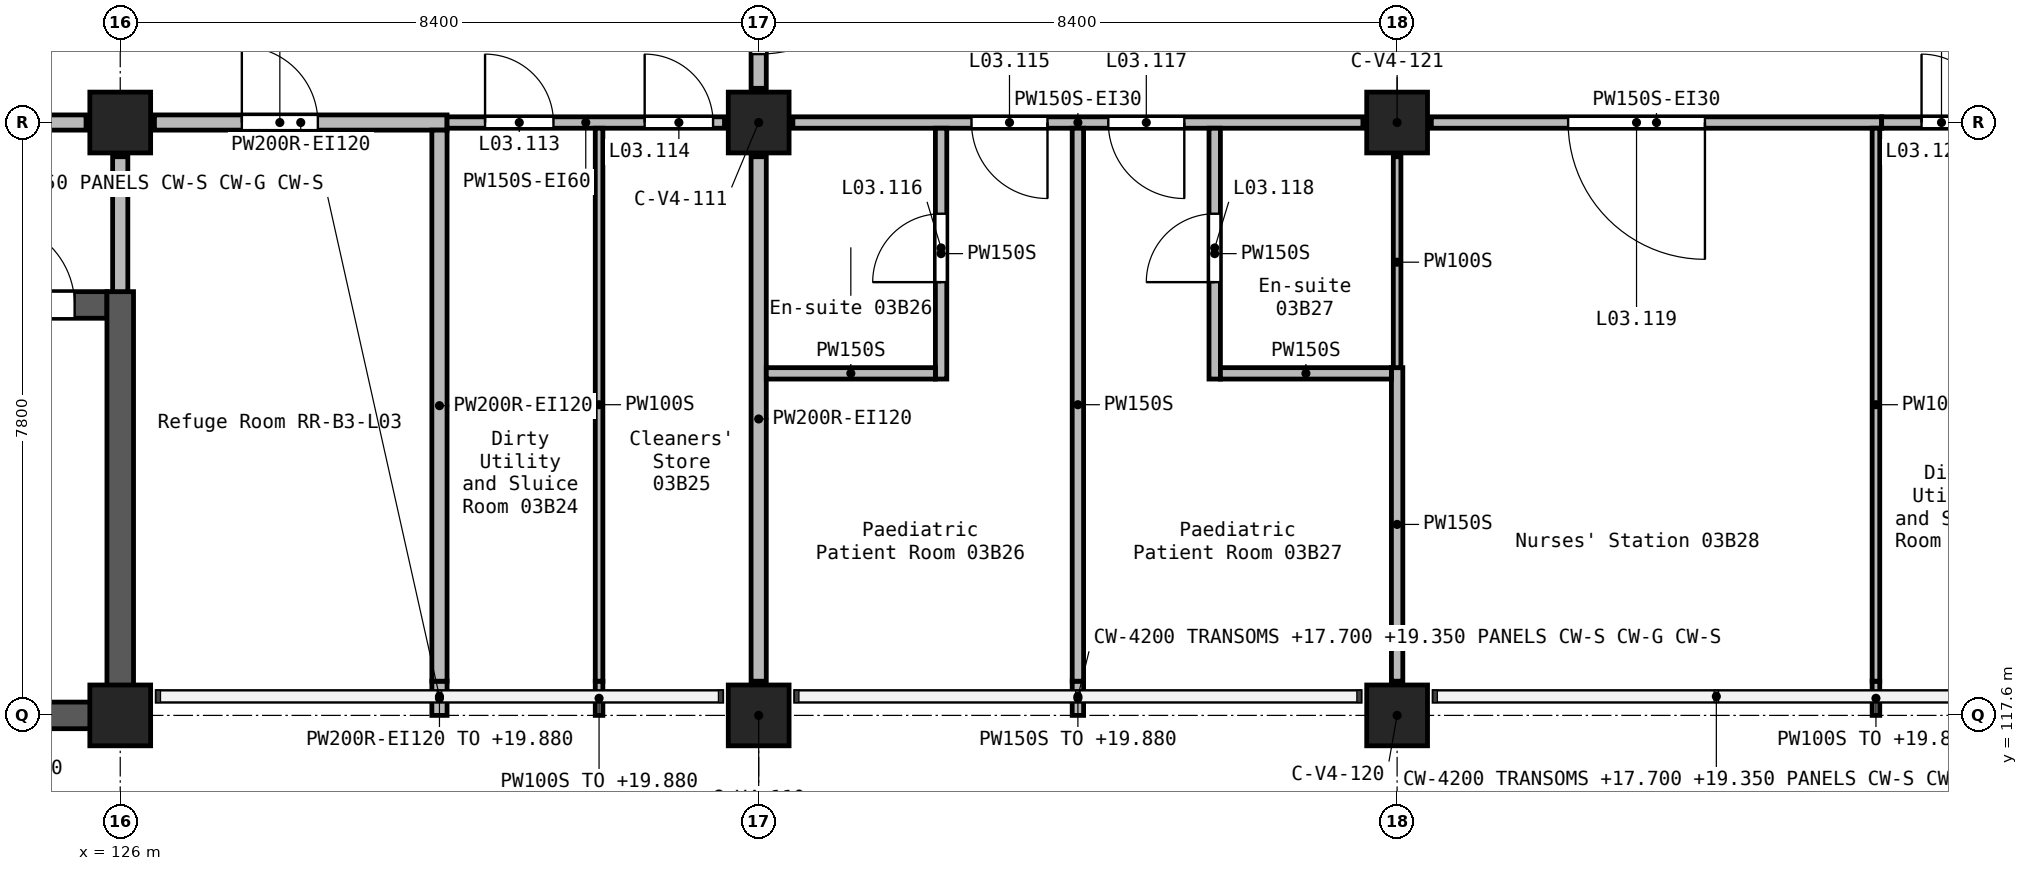
"""IFC4 building model, lengths in metres.
Left out: names, types, materials, properties, quantities, classifications, styles, units other than length and angle.
Written with IfcOpenShell. Run it as: python <this file> out.ifc"""

import sys

from ifc_helpers import new_model, si_unit, direction, frame, frame_2d, origin, origin_2d, place, context, subcontext, project, spatial, rectangle, extrude, element, fill, save


model = new_model("IFC4")
c1 = context("Model", 3, precision=1e-05, world=origin(), true_north=direction((0.0, 1.0)))
c2 = subcontext(c1, "Body", "Model", "MODEL_VIEW")
j1 = project(units=[si_unit("LENGTHUNIT", "METRE"), si_unit("PLANEANGLEUNIT", "RADIAN")], contexts=[c1])
p1 = place(None, origin())
s1 = spatial("IfcSite", under=j1, at=p1, CompositionType="ELEMENT")
p2 = place(p1, origin())
s2 = spatial("IfcBuilding", under=s1, at=p2, CompositionType="ELEMENT")
p3 = place(p2, frame((0.0, 0.0, 16.8)))
s3 = spatial("IfcBuildingStorey", under=s2, at=p3, CompositionType="ELEMENT", Elevation=16.8)
for number, where, z_axis, x_axis in (
    (1, (126.0, 117.6, 0.0), (0.0, 0.0, 1.0), (1.0, 0.0, 0.0)),
    (2, (126.0, 125.4, 0.0), (0.0, 0.0, 1.0), (1.0, 0.0, 0.0)),
    (3, (134.4, 117.6, 0.0), (0.0, 0.0, 1.0), (1.0, 0.0, 0.0)),
    (4, (134.4, 125.4, 0.0), (0.0, 0.0, 1.0), (1.0, 0.0, 0.0)),
    (5, (142.8, 117.6, 0.0), (0.0, 0.0, 1.0), (1.0, 0.0, 0.0)),
    (6, (142.8, 125.4, 0.0), (0.0, 0.0, 1.0), (1.0, 0.0, 0.0)),
):
    element("IfcColumn", number, at=place(p3, frame(where, z_axis=z_axis, x_axis=x_axis)), inside=s3, PredefinedType="COLUMN", context=c2, shape_type="SweptSolid", body=[
        extrude(rectangle(XDim=0.8, YDim=0.8, at=origin_2d()), origin(), (0.0, 0.0, 1.0), 4.2),
    ])
p4 = place(p3, frame((117.425, 123.0, 0.0), z_axis=(0.0, 0.0, 1.0), x_axis=(1.0, 0.0, 0.0)))
e7 = element("IfcWall", 7, at=p4, inside=s3, PredefinedType="SHEAR", context=c2, shape_type="SweptSolid", body=[
    extrude(rectangle(XDim=8.4, YDim=0.35, at=frame_2d((4.2, 0.0))), origin(), (0.0, 0.0, 1.0), 4.2),
])
p5 = place(p4, frame((6.875, 0.0, 0.0)))
e8 = element("IfcOpeningElement", 8, at=p5, cuts=e7, PredefinedType="OPENING", context=c2, shape_type="SweptSolid", body=[
    extrude(rectangle(XDim=1.1, YDim=2.1, at=frame_2d((0.55, 1.05))), frame((0.0, 0.185, 0.0), z_axis=(0.0, -1.0, 0.0), x_axis=(1.0, 0.0, 0.0)), (0.0, 0.0, 1.0), 0.37),
])
p6 = place(p3, frame((117.775, 117.6, 0.0), z_axis=(0.0, 0.0, 1.0), x_axis=(1.0, 0.0, 0.0)))
e9 = element("IfcWall", 9, at=p6, inside=s3, PredefinedType="SHEAR", context=c2, shape_type="SweptSolid", body=[
    extrude(rectangle(XDim=8.05, YDim=0.35, at=frame_2d((4.025, 0.0))), origin(), (0.0, 0.0, 1.0), 4.2),
])
p7 = place(p3, frame((126.0, 117.425, 0.0), z_axis=(0.0, 0.0, 1.0), x_axis=(0.0, 1.0, 0.0)))
e10 = element("IfcWall", 10, at=p7, inside=s3, PredefinedType="SHEAR", context=c2, shape_type="SweptSolid", body=[
    extrude(rectangle(XDim=5.75, YDim=0.35, at=frame_2d((2.875, 0.0))), origin(), (0.0, 0.0, 1.0), 4.2),
])
p8 = place(p3, frame((134.4, 128.55, 0.0), z_axis=(0.0, 0.0, 1.0), x_axis=(0.0, -1.0, 0.0)))
e11 = element("IfcWall", 11, at=p8, inside=s3, PredefinedType="SOLIDWALL", context=c2, shape_type="SweptSolid", body=[
    extrude(rectangle(XDim=2.7, YDim=0.2, at=frame_2d((1.35, 0.0))), origin(), (0.0, 0.0, 1.0), 3.9),
])
p9 = place(p8, frame((0.45, 0.0, 0.0)))
e12 = element("IfcOpeningElement", 12, at=p9, cuts=e11, PredefinedType="OPENING", context=c2, shape_type="SweptSolid", body=[
    extrude(rectangle(XDim=1.8, YDim=2.1, at=frame_2d((0.9, 1.05))), frame((0.0, 0.11, 0.0), z_axis=(0.0, -1.0, 0.0), x_axis=(1.0, 0.0, 0.0)), (0.0, 0.0, 1.0), 0.22),
])
p10 = place(p3, frame((134.4, 124.95, 0.0), z_axis=(0.0, 0.0, 1.0), x_axis=(0.0, -1.0, 0.0)))
e13 = element("IfcWall", 13, at=p10, inside=s3, PredefinedType="SOLIDWALL", context=c2, shape_type="SweptSolid", body=[
    extrude(rectangle(XDim=6.9, YDim=0.2, at=frame_2d((3.45, 0.0))), origin(), (0.0, 0.0, 1.0), 3.9),
])
p11 = place(p3, frame((118.05, 125.4, 0.0), z_axis=(0.0, 0.0, 1.0), x_axis=(1.0, 0.0, 0.0)))
e14 = element("IfcWall", 14, at=p11, inside=s3, PredefinedType="SOLIDWALL", context=c2, shape_type="SweptSolid", body=[
    extrude(rectangle(XDim=7.5, YDim=0.2, at=frame_2d((3.75, 0.0))), origin(), (0.0, 0.0, 1.0), 3.9),
])
p12 = place(p11, frame((3.2, 0.0, 0.0)))
e15 = element("IfcOpeningElement", 15, at=p12, cuts=e14, PredefinedType="OPENING", context=c2, shape_type="SweptSolid", body=[
    extrude(rectangle(XDim=1.1, YDim=2.1, at=frame_2d((0.55, 1.05))), frame((0.0, 0.11, 0.0), z_axis=(0.0, -1.0, 0.0), x_axis=(1.0, 0.0, 0.0)), (0.0, 0.0, 1.0), 0.22),
])
p13 = place(p3, frame((126.45, 125.4, 0.0), z_axis=(0.0, 0.0, 1.0), x_axis=(1.0, 0.0, 0.0)))
e16 = element("IfcWall", 16, at=p13, inside=s3, PredefinedType="SOLIDWALL", context=c2, shape_type="SweptSolid", body=[
    extrude(rectangle(XDim=3.85, YDim=0.2, at=frame_2d((1.925, 0.0))), origin(), (0.0, 0.0, 1.0), 3.9),
])
p14 = place(p13, frame((1.15, 0.0, 0.0)))
e17 = element("IfcOpeningElement", 17, at=p14, cuts=e16, PredefinedType="OPENING", context=c2, shape_type="SweptSolid", body=[
    extrude(rectangle(XDim=1.0, YDim=2.1, at=frame_2d((0.5, 1.05))), frame((0.0, 0.11, 0.0), z_axis=(0.0, -1.0, 0.0), x_axis=(1.0, 0.0, 0.0)), (0.0, 0.0, 1.0), 0.22),
])
p15 = place(p3, frame((126.0, 123.175, 0.0), z_axis=(0.0, 0.0, 1.0), x_axis=(0.0, 1.0, 0.0)))
e18 = element("IfcWall", 18, at=p15, inside=s3, PredefinedType="SOLIDWALL", context=c2, shape_type="SweptSolid", body=[
    extrude(rectangle(XDim=1.775, YDim=0.2, at=frame_2d((0.887, 0.0))), origin(), (0.0, 0.0, 1.0), 3.9),
])
p16 = place(p3, frame((130.2, 117.6, 0.0), z_axis=(0.0, 0.0, 1.0), x_axis=(0.0, 1.0, 0.0)))
e19 = element("IfcWall", 19, at=p16, inside=s3, PredefinedType="SOLIDWALL", context=c2, shape_type="SweptSolid", body=[
    extrude(rectangle(XDim=0.45, YDim=0.2, at=frame_2d((0.225, 0.0))), origin(), (0.0, 0.0, 1.0), 3.08),
])
p17 = place(p3, frame((130.2, 118.05, 0.0), z_axis=(0.0, 0.0, 1.0), x_axis=(0.0, 1.0, 0.0)))
e20 = element("IfcWall", 20, at=p17, inside=s3, PredefinedType="SOLIDWALL", context=c2, shape_type="SweptSolid", body=[
    extrude(rectangle(XDim=7.25, YDim=0.2, at=frame_2d((3.625, 0.0))), origin(), (0.0, 0.0, 1.0), 3.9),
])
p18 = place(p3, frame((149.175, 125.4, 0.0), z_axis=(0.0, 0.0, 1.0), x_axis=(-1.0, 0.0, 0.0)))
e21 = element("IfcWall", 21, at=p18, inside=s3, PredefinedType="PARTITIONING", context=c2, shape_type="SweptSolid", body=[
    extrude(rectangle(XDim=5.925, YDim=0.15, at=frame_2d((2.962, 0.0))), origin(), (0.0, 0.0, 1.0), 3.9),
])
p19 = place(p18, frame((2.325, 0.0, 0.0)))
e22 = element("IfcOpeningElement", 22, at=p19, cuts=e21, PredefinedType="OPENING", context=c2, shape_type="SweptSolid", body=[
    extrude(rectangle(XDim=1.8, YDim=2.1, at=frame_2d((0.9, 1.05))), frame((0.0, 0.085, 0.0), z_axis=(0.0, -1.0, 0.0), x_axis=(1.0, 0.0, 0.0)), (0.0, 0.0, 1.0), 0.17),
])
p20 = place(p3, frame((142.35, 125.4, 0.0), z_axis=(0.0, 0.0, 1.0), x_axis=(-1.0, 0.0, 0.0)))
e23 = element("IfcWall", 23, at=p20, inside=s3, PredefinedType="PARTITIONING", context=c2, shape_type="SweptSolid", body=[
    extrude(rectangle(XDim=7.5, YDim=0.15, at=frame_2d((3.75, 0.0))), origin(), (0.0, 0.0, 1.0), 3.9),
])
p21 = place(p20, frame((4.15, 0.0, 0.0)))
e24 = element("IfcOpeningElement", 24, at=p21, cuts=e23, PredefinedType="OPENING", context=c2, shape_type="SweptSolid", body=[
    extrude(rectangle(XDim=1.0, YDim=2.1, at=frame_2d((0.5, 1.05))), frame((0.0, 0.085, 0.0), z_axis=(0.0, -1.0, 0.0), x_axis=(1.0, 0.0, 0.0)), (0.0, 0.0, 1.0), 0.17),
])
p22 = place(p20, frame((2.35, 0.0, 0.0)))
e25 = element("IfcOpeningElement", 25, at=p22, cuts=e23, PredefinedType="OPENING", context=c2, shape_type="SweptSolid", body=[
    extrude(rectangle(XDim=1.0, YDim=2.1, at=frame_2d((0.5, 1.05))), frame((0.0, 0.085, 0.0), z_axis=(0.0, -1.0, 0.0), x_axis=(1.0, 0.0, 0.0)), (0.0, 0.0, 1.0), 0.17),
])
p23 = place(p3, frame((130.3, 125.4, 0.0), z_axis=(0.0, 0.0, 1.0), x_axis=(1.0, 0.0, 0.0)))
e26 = element("IfcWall", 26, at=p23, inside=s3, PredefinedType="PARTITIONING", context=c2, shape_type="SweptSolid", body=[
    extrude(rectangle(XDim=3.65, YDim=0.15, at=frame_2d((1.825, 0.0))), origin(), (0.0, 0.0, 1.0), 3.9),
])
p24 = place(p23, frame((0.5, 0.0, 0.0)))
e27 = element("IfcOpeningElement", 27, at=p24, cuts=e26, PredefinedType="OPENING", context=c2, shape_type="SweptSolid", body=[
    extrude(rectangle(XDim=0.9, YDim=2.1, at=frame_2d((0.45, 1.05))), frame((0.0, 0.085, 0.0), z_axis=(0.0, -1.0, 0.0), x_axis=(1.0, 0.0, 0.0)), (0.0, 0.0, 1.0), 0.17),
])
p25 = place(p23, frame((2.6, 0.0, 0.0)))
e28 = element("IfcOpeningElement", 28, at=p25, cuts=e26, PredefinedType="OPENING", context=c2, shape_type="SweptSolid", body=[
    extrude(rectangle(XDim=0.9, YDim=2.1, at=frame_2d((0.45, 1.05))), frame((0.0, 0.085, 0.0), z_axis=(0.0, -1.0, 0.0), x_axis=(1.0, 0.0, 0.0)), (0.0, 0.0, 1.0), 0.17),
])
p26 = place(p3, frame((149.175, 125.4, 0.0), z_axis=(0.0, 0.0, 1.0), x_axis=(1.0, 0.0, 0.0)))
e29 = element("IfcWall", 29, at=p26, inside=s3, PredefinedType="PARTITIONING", context=c2, shape_type="SweptSolid", body=[
    extrude(rectangle(XDim=1.575, YDim=0.15, at=frame_2d((0.788, 0.0))), origin(), (0.0, 0.0, 1.0), 3.9),
])
p27 = place(p26, frame((0.525, 0.0, 0.0)))
e30 = element("IfcOpeningElement", 30, at=p27, cuts=e29, PredefinedType="OPENING", context=c2, shape_type="SweptSolid", body=[
    extrude(rectangle(XDim=0.9, YDim=2.1, at=frame_2d((0.45, 1.05))), frame((0.0, 0.085, 0.0), z_axis=(0.0, -1.0, 0.0), x_axis=(1.0, 0.0, 0.0)), (0.0, 0.0, 1.0), 0.17),
])
p28 = place(p3, frame((138.6, 117.6, 0.0), z_axis=(0.0, 0.0, 1.0), x_axis=(0.0, 1.0, 0.0)))
e31 = element("IfcWall", 31, at=p28, inside=s3, PredefinedType="PARTITIONING", context=c2, shape_type="SweptSolid", body=[
    extrude(rectangle(XDim=0.45, YDim=0.15, at=frame_2d((0.225, 0.0))), origin(), (0.0, 0.0, 1.0), 3.08),
])
p29 = place(p3, frame((138.6, 118.05, 0.0), z_axis=(0.0, 0.0, 1.0), x_axis=(0.0, 1.0, 0.0)))
e32 = element("IfcWall", 32, at=p29, inside=s3, PredefinedType="PARTITIONING", context=c2, shape_type="SweptSolid", body=[
    extrude(rectangle(XDim=7.275, YDim=0.15, at=frame_2d((3.637, 0.0))), origin(), (0.0, 0.0, 1.0), 3.9),
])
p30 = place(p3, frame((142.8, 118.05, 0.0), z_axis=(0.0, 0.0, 1.0), x_axis=(0.0, 1.0, 0.0)))
e33 = element("IfcWall", 33, at=p30, inside=s3, PredefinedType="PARTITIONING", context=c2, shape_type="SweptSolid", body=[
    extrude(rectangle(XDim=4.125, YDim=0.15, at=frame_2d((2.062, 0.0))), origin(), (0.0, 0.0, 1.0), 3.9),
])
p31 = place(p3, frame((136.8, 122.025, 0.0), z_axis=(0.0, 0.0, 1.0), x_axis=(0.0, 1.0, 0.0)))
e34 = element("IfcWall", 34, at=p31, inside=s3, PredefinedType="PARTITIONING", context=c2, shape_type="SweptSolid", body=[
    extrude(rectangle(XDim=3.3, YDim=0.15, at=frame_2d((1.65, 0.0))), origin(), (0.0, 0.0, 1.0), 3.9),
])
p32 = place(p31, frame((1.275, 0.0, 0.0)))
e35 = element("IfcOpeningElement", 35, at=p32, cuts=e34, PredefinedType="OPENING", context=c2, shape_type="SweptSolid", body=[
    extrude(rectangle(XDim=0.9, YDim=2.1, at=frame_2d((0.45, 1.05))), frame((0.0, 0.085, 0.0), z_axis=(0.0, -1.0, 0.0), x_axis=(1.0, 0.0, 0.0)), (0.0, 0.0, 1.0), 0.17),
])
p33 = place(p3, frame((140.4, 122.025, 0.0), z_axis=(0.0, 0.0, 1.0), x_axis=(0.0, 1.0, 0.0)))
e36 = element("IfcWall", 36, at=p33, inside=s3, PredefinedType="PARTITIONING", context=c2, shape_type="SweptSolid", body=[
    extrude(rectangle(XDim=3.3, YDim=0.15, at=frame_2d((1.65, 0.0))), origin(), (0.0, 0.0, 1.0), 3.9),
])
p34 = place(p33, frame((1.275, 0.0, 0.0)))
e37 = element("IfcOpeningElement", 37, at=p34, cuts=e36, PredefinedType="OPENING", context=c2, shape_type="SweptSolid", body=[
    extrude(rectangle(XDim=0.9, YDim=2.1, at=frame_2d((0.45, 1.05))), frame((0.0, 0.085, 0.0), z_axis=(0.0, -1.0, 0.0), x_axis=(1.0, 0.0, 0.0)), (0.0, 0.0, 1.0), 0.17),
])
p35 = place(p3, frame((134.5, 122.1, 0.0), z_axis=(0.0, 0.0, 1.0), x_axis=(1.0, 0.0, 0.0)))
e38 = element("IfcWall", 38, at=p35, inside=s3, PredefinedType="PARTITIONING", context=c2, shape_type="SweptSolid", body=[
    extrude(rectangle(XDim=2.225, YDim=0.15, at=frame_2d((1.113, 0.0))), origin(), (0.0, 0.0, 1.0), 3.9),
])
p36 = place(p3, frame((140.475, 122.1, 0.0), z_axis=(0.0, 0.0, 1.0), x_axis=(1.0, 0.0, 0.0)))
e39 = element("IfcWall", 39, at=p36, inside=s3, PredefinedType="PARTITIONING", context=c2, shape_type="SweptSolid", body=[
    extrude(rectangle(XDim=2.25, YDim=0.15, at=frame_2d((1.125, 0.0))), origin(), (0.0, 0.0, 1.0), 3.9),
])
p37 = place(p3, frame((132.3, 117.6, 0.0), z_axis=(0.0, 0.0, 1.0), x_axis=(0.0, 1.0, 0.0)))
e40 = element("IfcWall", 40, at=p37, inside=s3, PredefinedType="PARTITIONING", context=c2, shape_type="SweptSolid", body=[
    extrude(rectangle(XDim=0.45, YDim=0.1, at=frame_2d((0.225, 0.0))), origin(), (0.0, 0.0, 1.0), 3.08),
])
p38 = place(p3, frame((132.3, 118.05, 0.0), z_axis=(0.0, 0.0, 1.0), x_axis=(0.0, 1.0, 0.0)))
e41 = element("IfcWall", 41, at=p38, inside=s3, PredefinedType="PARTITIONING", context=c2, shape_type="SweptSolid", body=[
    extrude(rectangle(XDim=7.275, YDim=0.1, at=frame_2d((3.637, 0.0))), origin(), (0.0, 0.0, 1.0), 3.9),
])
p39 = place(p3, frame((149.1, 117.6, 0.0), z_axis=(0.0, 0.0, 1.0), x_axis=(0.0, 1.0, 0.0)))
e42 = element("IfcWall", 42, at=p39, inside=s3, PredefinedType="PARTITIONING", context=c2, shape_type="SweptSolid", body=[
    extrude(rectangle(XDim=0.45, YDim=0.1, at=frame_2d((0.225, 0.0))), origin(), (0.0, 0.0, 1.0), 3.08),
])
p40 = place(p3, frame((149.1, 118.05, 0.0), z_axis=(0.0, 0.0, 1.0), x_axis=(0.0, 1.0, 0.0)))
e43 = element("IfcWall", 43, at=p40, inside=s3, PredefinedType="PARTITIONING", context=c2, shape_type="SweptSolid", body=[
    extrude(rectangle(XDim=7.275, YDim=0.1, at=frame_2d((3.637, 0.0))), origin(), (0.0, 0.0, 1.0), 3.9),
])
p41 = place(p3, frame((142.8, 122.175, 0.0), z_axis=(0.0, 0.0, 1.0), x_axis=(0.0, 1.0, 0.0)))
e44 = element("IfcWall", 44, at=p41, inside=s3, PredefinedType="PARTITIONING", context=c2, shape_type="SweptSolid", body=[
    extrude(rectangle(XDim=2.775, YDim=0.1, at=frame_2d((1.387, 0.0))), origin(), (0.0, 0.0, 1.0), 3.9),
])
p42 = place(p9, origin())
e45 = element("IfcDoor", 45, at=p42, inside=s3, OperationType="DOUBLE_DOOR_SINGLE_SWING", PredefinedType="DOOR", context=c2, shape_type="SweptSolid", body=[
    extrude(rectangle(XDim=1.8, YDim=2.1, at=frame_2d((0.9, 1.05))), frame((0.0, 0.025, 0.0), z_axis=(0.0, -1.0, 0.0), x_axis=(1.0, 0.0, 0.0)), (0.0, 0.0, 1.0), 0.05),
])
fill(e12, e45)
p43 = place(p24, frame((0.9, 0.0, 0.0), z_axis=(0.0, 0.0, 1.0), x_axis=(-1.0, 0.0, 0.0)))
e46 = element("IfcDoor", 46, at=p43, inside=s3, OperationType="SINGLE_SWING_RIGHT", PredefinedType="DOOR", context=c2, shape_type="SweptSolid", body=[
    extrude(rectangle(XDim=0.9, YDim=2.1, at=frame_2d((0.45, 1.05))), frame((0.0, 0.025, 0.0), z_axis=(0.0, -1.0, 0.0), x_axis=(1.0, 0.0, 0.0)), (0.0, 0.0, 1.0), 0.05),
])
fill(e27, e46)
p44 = place(p25, frame((0.9, 0.0, 0.0), z_axis=(0.0, 0.0, 1.0), x_axis=(-1.0, 0.0, 0.0)))
e47 = element("IfcDoor", 47, at=p44, inside=s3, OperationType="SINGLE_SWING_LEFT", PredefinedType="DOOR", context=c2, shape_type="SweptSolid", body=[
    extrude(rectangle(XDim=0.9, YDim=2.1, at=frame_2d((0.45, 1.05))), frame((0.0, 0.025, 0.0), z_axis=(0.0, -1.0, 0.0), x_axis=(1.0, 0.0, 0.0)), (0.0, 0.0, 1.0), 0.05),
])
fill(e28, e47)
p45 = place(p21, origin())
e48 = element("IfcDoor", 48, at=p45, inside=s3, OperationType="SINGLE_SWING_RIGHT", PredefinedType="DOOR", context=c2, shape_type="SweptSolid", body=[
    extrude(rectangle(XDim=1.0, YDim=2.1, at=frame_2d((0.5, 1.05))), frame((0.0, 0.025, 0.0), z_axis=(0.0, -1.0, 0.0), x_axis=(1.0, 0.0, 0.0)), (0.0, 0.0, 1.0), 0.05),
])
fill(e24, e48)
p46 = place(p32, origin())
e49 = element("IfcDoor", 49, at=p46, inside=s3, OperationType="SINGLE_SWING_RIGHT", PredefinedType="DOOR", context=c2, shape_type="SweptSolid", body=[
    extrude(rectangle(XDim=0.9, YDim=2.1, at=frame_2d((0.45, 1.05))), frame((0.0, 0.025, 0.0), z_axis=(0.0, -1.0, 0.0), x_axis=(1.0, 0.0, 0.0)), (0.0, 0.0, 1.0), 0.05),
])
fill(e35, e49)
p47 = place(p22, origin())
e50 = element("IfcDoor", 50, at=p47, inside=s3, OperationType="SINGLE_SWING_LEFT", PredefinedType="DOOR", context=c2, shape_type="SweptSolid", body=[
    extrude(rectangle(XDim=1.0, YDim=2.1, at=frame_2d((0.5, 1.05))), frame((0.0, 0.025, 0.0), z_axis=(0.0, -1.0, 0.0), x_axis=(1.0, 0.0, 0.0)), (0.0, 0.0, 1.0), 0.05),
])
fill(e25, e50)
p48 = place(p34, frame((0.9, 0.0, 0.0), z_axis=(0.0, 0.0, 1.0), x_axis=(-1.0, 0.0, 0.0)))
e51 = element("IfcDoor", 51, at=p48, inside=s3, OperationType="SINGLE_SWING_LEFT", PredefinedType="DOOR", context=c2, shape_type="SweptSolid", body=[
    extrude(rectangle(XDim=0.9, YDim=2.1, at=frame_2d((0.45, 1.05))), frame((0.0, 0.025, 0.0), z_axis=(0.0, -1.0, 0.0), x_axis=(1.0, 0.0, 0.0)), (0.0, 0.0, 1.0), 0.05),
])
fill(e37, e51)
p49 = place(p19, origin())
e52 = element("IfcDoor", 52, at=p49, inside=s3, OperationType="DOUBLE_DOOR_SINGLE_SWING", PredefinedType="DOOR", context=c2, shape_type="SweptSolid", body=[
    extrude(rectangle(XDim=1.8, YDim=2.1, at=frame_2d((0.9, 1.05))), frame((0.0, 0.025, 0.0), z_axis=(0.0, -1.0, 0.0), x_axis=(1.0, 0.0, 0.0)), (0.0, 0.0, 1.0), 0.05),
])
fill(e22, e52)
p50 = place(p27, frame((0.9, 0.0, 0.0), z_axis=(0.0, 0.0, 1.0), x_axis=(-1.0, 0.0, 0.0)))
e53 = element("IfcDoor", 53, at=p50, inside=s3, OperationType="SINGLE_SWING_LEFT", PredefinedType="DOOR", context=c2, shape_type="SweptSolid", body=[
    extrude(rectangle(XDim=0.9, YDim=2.1, at=frame_2d((0.45, 1.05))), frame((0.0, 0.025, 0.0), z_axis=(0.0, -1.0, 0.0), x_axis=(1.0, 0.0, 0.0)), (0.0, 0.0, 1.0), 0.05),
])
fill(e30, e53)
p51 = place(p14, frame((1.0, 0.0, 0.0), z_axis=(0.0, 0.0, 1.0), x_axis=(-1.0, 0.0, 0.0)))
e54 = element("IfcDoor", 54, at=p51, inside=s3, OperationType="SINGLE_SWING_RIGHT", PredefinedType="DOOR", context=c2, shape_type="SweptSolid", body=[
    extrude(rectangle(XDim=1.0, YDim=2.1, at=frame_2d((0.5, 1.05))), frame((0.0, 0.025, 0.0), z_axis=(0.0, -1.0, 0.0), x_axis=(1.0, 0.0, 0.0)), (0.0, 0.0, 1.0), 0.05),
])
fill(e17, e54)
p52 = place(p5, frame((1.1, 0.0, 0.0), z_axis=(0.0, 0.0, 1.0), x_axis=(-1.0, 0.0, 0.0)))
e55 = element("IfcDoor", 55, at=p52, inside=s3, OperationType="SINGLE_SWING_LEFT", PredefinedType="DOOR", context=c2, shape_type="SweptSolid", body=[
    extrude(rectangle(XDim=1.1, YDim=2.1, at=frame_2d((0.55, 1.05))), frame((0.0, 0.025, 0.0), z_axis=(0.0, -1.0, 0.0), x_axis=(1.0, 0.0, 0.0)), (0.0, 0.0, 1.0), 0.05),
])
fill(e8, e55)
save(model, sys.argv[1])
